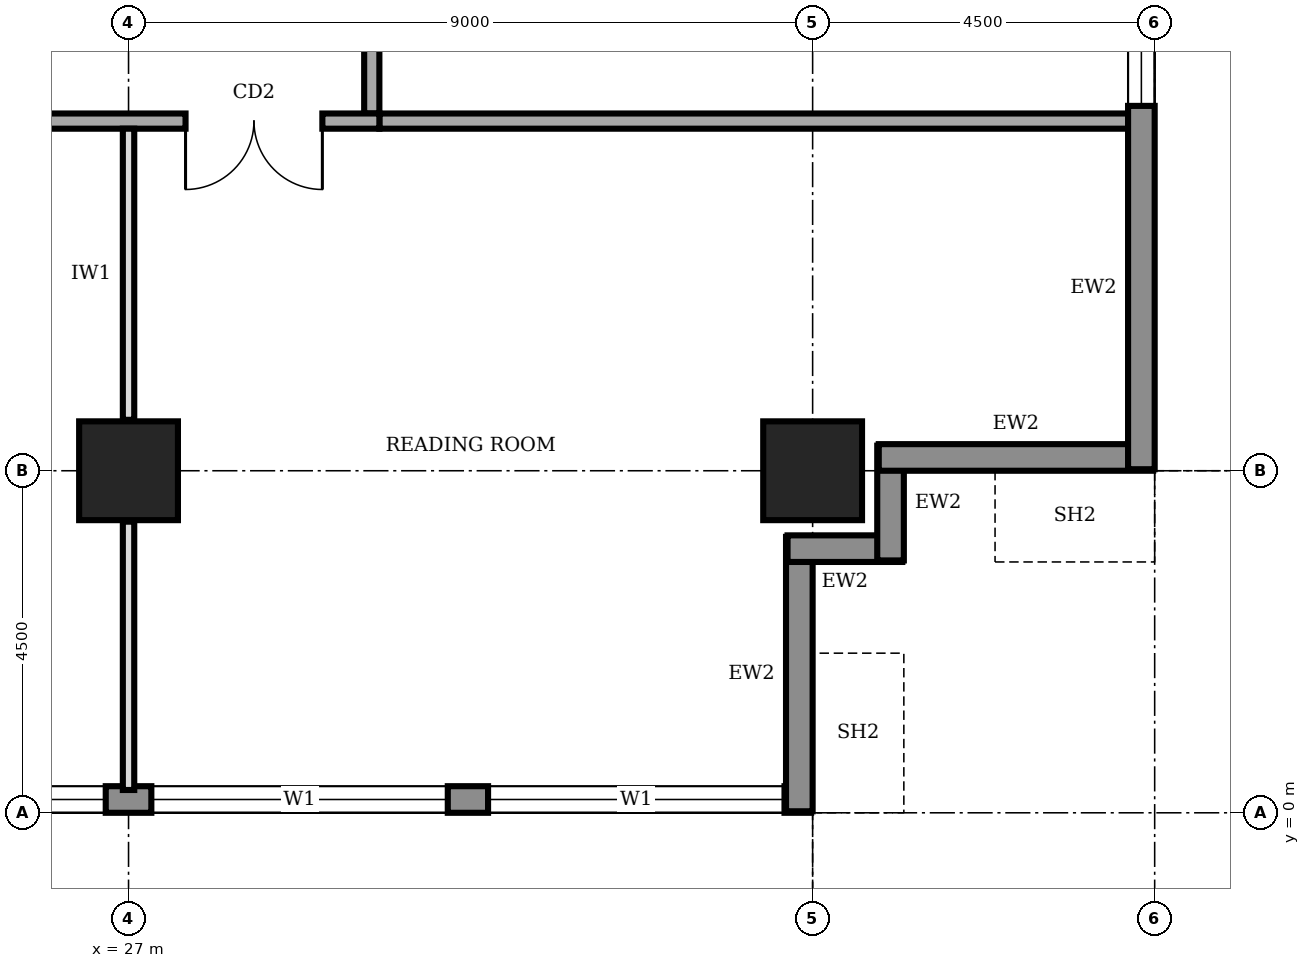
"""IFC4 building model, lengths in metres.
Left out: names, types, materials, properties, quantities, classifications, styles, units other than length and angle.
Written with IfcOpenShell. Run it as: python <this file> out.ifc"""

import sys

from ifc_helpers import new_model, si_unit, direction, frame, frame_2d, origin, origin_2d, place, context, subcontext, project, spatial, rectangle, extrude, element, fill, save


model = new_model("IFC4")
c1 = context("Model", 3, precision=1e-05, world=origin(), true_north=direction((0.0, 1.0)))
c2 = subcontext(c1, "Body", "Model", "MODEL_VIEW")
j1 = project(units=[si_unit("LENGTHUNIT", "METRE"), si_unit("PLANEANGLEUNIT", "RADIAN")], contexts=[c1])
p1 = place(None, origin())
s1 = spatial("IfcSite", under=j1, at=p1, CompositionType="ELEMENT")
p2 = place(p1, origin())
s2 = spatial("IfcBuilding", under=s1, at=p2, CompositionType="ELEMENT")
p3 = place(p2, frame((0.0, 0.0, 285.0)))
s3 = spatial("IfcBuildingStorey", under=s2, at=p3, CompositionType="ELEMENT", Elevation=285.0)
for number, where, z_axis, x_axis in (
    (1, (27.0, 4.5, 0.0), (0.0, 0.0, 1.0), (1.0, 0.0, 0.0)),
    (2, (36.0, 4.5, 0.0), (0.0, 0.0, 1.0), (1.0, 0.0, 0.0)),
):
    element("IfcColumn", number, at=place(p3, frame(where, z_axis=z_axis, x_axis=x_axis)), inside=s3, PredefinedType="COLUMN", context=c2, shape_type="SweptSolid", body=[
        extrude(rectangle(XDim=1.3, YDim=1.3, at=origin_2d()), origin(), (0.0, 0.0, 1.0), 4.0),
    ])
p4 = place(p3, frame((4.52, 0.175, 0.0), z_axis=(0.0, 0.0, 1.0), x_axis=(1.0, 0.0, 0.0)))
e3 = element("IfcWall", 3, at=p4, inside=s3, PredefinedType="STANDARD", context=c2, shape_type="SweptSolid", body=[
    extrude(rectangle(XDim=31.46, YDim=0.35, at=frame_2d((15.73, 0.0))), origin(), (0.0, 0.0, 1.0), 3.75),
])
p5 = place(p4, frame((4.78, 0.0, 0.9)))
e4 = element("IfcOpeningElement", 4, at=p5, cuts=e3, PredefinedType="OPENING", context=c2, shape_type="SweptSolid", body=[
    extrude(rectangle(XDim=3.9, YDim=2.2, at=frame_2d((1.95, 1.1))), frame((0.0, 0.185, 0.0), z_axis=(0.0, -1.0, 0.0), x_axis=(1.0, 0.0, 0.0)), (0.0, 0.0, 1.0), 0.37),
])
p6 = place(p4, frame((9.28, 0.0, 0.9)))
e5 = element("IfcOpeningElement", 5, at=p6, cuts=e3, PredefinedType="OPENING", context=c2, shape_type="SweptSolid", body=[
    extrude(rectangle(XDim=3.9, YDim=2.2, at=frame_2d((1.95, 1.1))), frame((0.0, 0.185, 0.0), z_axis=(0.0, -1.0, 0.0), x_axis=(1.0, 0.0, 0.0)), (0.0, 0.0, 1.0), 0.37),
])
p7 = place(p4, frame((13.78, 0.0, 0.9)))
e6 = element("IfcOpeningElement", 6, at=p7, cuts=e3, PredefinedType="OPENING", context=c2, shape_type="SweptSolid", body=[
    extrude(rectangle(XDim=3.9, YDim=2.2, at=frame_2d((1.95, 1.1))), frame((0.0, 0.185, 0.0), z_axis=(0.0, -1.0, 0.0), x_axis=(1.0, 0.0, 0.0)), (0.0, 0.0, 1.0), 0.37),
])
p8 = place(p4, frame((18.28, 0.0, 0.9)))
e7 = element("IfcOpeningElement", 7, at=p8, cuts=e3, PredefinedType="OPENING", context=c2, shape_type="SweptSolid", body=[
    extrude(rectangle(XDim=3.9, YDim=2.2, at=frame_2d((1.95, 1.1))), frame((0.0, 0.185, 0.0), z_axis=(0.0, -1.0, 0.0), x_axis=(1.0, 0.0, 0.0)), (0.0, 0.0, 1.0), 0.37),
])
p9 = place(p4, frame((22.78, 0.0, 0.9)))
e8 = element("IfcOpeningElement", 8, at=p9, cuts=e3, PredefinedType="OPENING", context=c2, shape_type="SweptSolid", body=[
    extrude(rectangle(XDim=3.9, YDim=2.2, at=frame_2d((1.95, 1.1))), frame((0.0, 0.185, 0.0), z_axis=(0.0, -1.0, 0.0), x_axis=(1.0, 0.0, 0.0)), (0.0, 0.0, 1.0), 0.37),
])
p10 = place(p4, frame((27.21, 0.0, 0.9)))
e9 = element("IfcOpeningElement", 9, at=p10, cuts=e3, PredefinedType="OPENING", context=c2, shape_type="SweptSolid", body=[
    extrude(rectangle(XDim=3.9, YDim=2.2, at=frame_2d((1.95, 1.1))), frame((0.0, 0.185, 0.0), z_axis=(0.0, -1.0, 0.0), x_axis=(1.0, 0.0, 0.0)), (0.0, 0.0, 1.0), 0.37),
])
p11 = place(p3, frame((35.825, 0.02, 0.0), z_axis=(0.0, 0.0, 1.0), x_axis=(0.0, 1.0, 0.0)))
e10 = element("IfcWall", 10, at=p11, inside=s3, PredefinedType="STANDARD", context=c2, shape_type="SweptSolid", body=[
    extrude(rectangle(XDim=3.61, YDim=0.35, at=frame_2d((1.805, 0.0))), origin(), (0.0, 0.0, 1.0), 2.65),
])
for number, where, z_axis, x_axis in (
    (11, (35.67, 3.475, 0.0), (0.0, 0.0, 1.0), (1.0, 0.0, 0.0)),
    (12, (37.025, 3.32, 0.0), (0.0, 0.0, 1.0), (0.0, 1.0, 0.0)),
):
    element("IfcWall", number, at=place(p3, frame(where, z_axis=z_axis, x_axis=x_axis)), inside=s3, PredefinedType="STANDARD", context=c2, shape_type="SweptSolid", body=[
        extrude(rectangle(XDim=1.51, YDim=0.35, at=frame_2d((0.755, 0.0))), origin(), (0.0, 0.0, 1.0), 3.75),
    ])
p12 = place(p3, frame((36.87, 4.675, 0.0), z_axis=(0.0, 0.0, 1.0), x_axis=(1.0, 0.0, 0.0)))
e13 = element("IfcWall", 13, at=p12, inside=s3, PredefinedType="STANDARD", context=c2, shape_type="SweptSolid", body=[
    extrude(rectangle(XDim=3.61, YDim=0.35, at=frame_2d((1.805, 0.0))), origin(), (0.0, 0.0, 1.0), 2.65),
])
p13 = place(p3, frame((40.325, 4.52, 0.0), z_axis=(0.0, 0.0, 1.0), x_axis=(0.0, 1.0, 0.0)))
e14 = element("IfcWall", 14, at=p13, inside=s3, PredefinedType="STANDARD", context=c2, shape_type="SweptSolid", body=[
    extrude(rectangle(XDim=31.46, YDim=0.35, at=frame_2d((15.73, 0.0))), origin(), (0.0, 0.0, 1.0), 3.75),
])
p14 = place(p13, frame((4.78, 0.0, 0.9)))
e15 = element("IfcOpeningElement", 15, at=p14, cuts=e14, PredefinedType="OPENING", context=c2, shape_type="SweptSolid", body=[
    extrude(rectangle(XDim=3.9, YDim=2.2, at=frame_2d((1.95, 1.1))), frame((0.0, 0.185, 0.0), z_axis=(0.0, -1.0, 0.0), x_axis=(1.0, 0.0, 0.0)), (0.0, 0.0, 1.0), 0.37),
])
p15 = place(p13, frame((9.28, 0.0, 0.9)))
e16 = element("IfcOpeningElement", 16, at=p15, cuts=e14, PredefinedType="OPENING", context=c2, shape_type="SweptSolid", body=[
    extrude(rectangle(XDim=3.9, YDim=2.2, at=frame_2d((1.95, 1.1))), frame((0.0, 0.185, 0.0), z_axis=(0.0, -1.0, 0.0), x_axis=(1.0, 0.0, 0.0)), (0.0, 0.0, 1.0), 0.37),
])
p16 = place(p13, frame((13.78, 0.0, 0.9)))
e17 = element("IfcOpeningElement", 17, at=p16, cuts=e14, PredefinedType="OPENING", context=c2, shape_type="SweptSolid", body=[
    extrude(rectangle(XDim=3.9, YDim=2.2, at=frame_2d((1.95, 1.1))), frame((0.0, 0.185, 0.0), z_axis=(0.0, -1.0, 0.0), x_axis=(1.0, 0.0, 0.0)), (0.0, 0.0, 1.0), 0.37),
])
p17 = place(p13, frame((18.28, 0.0, 0.9)))
e18 = element("IfcOpeningElement", 18, at=p17, cuts=e14, PredefinedType="OPENING", context=c2, shape_type="SweptSolid", body=[
    extrude(rectangle(XDim=3.9, YDim=2.2, at=frame_2d((1.95, 1.1))), frame((0.0, 0.185, 0.0), z_axis=(0.0, -1.0, 0.0), x_axis=(1.0, 0.0, 0.0)), (0.0, 0.0, 1.0), 0.37),
])
p18 = place(p13, frame((22.78, 0.0, 0.9)))
e19 = element("IfcOpeningElement", 19, at=p18, cuts=e14, PredefinedType="OPENING", context=c2, shape_type="SweptSolid", body=[
    extrude(rectangle(XDim=3.9, YDim=2.2, at=frame_2d((1.95, 1.1))), frame((0.0, 0.185, 0.0), z_axis=(0.0, -1.0, 0.0), x_axis=(1.0, 0.0, 0.0)), (0.0, 0.0, 1.0), 0.37),
])
p19 = place(p13, frame((27.21, 0.0, 0.9)))
e20 = element("IfcOpeningElement", 20, at=p19, cuts=e14, PredefinedType="OPENING", context=c2, shape_type="SweptSolid", body=[
    extrude(rectangle(XDim=3.9, YDim=2.2, at=frame_2d((1.95, 1.1))), frame((0.0, 0.185, 0.0), z_axis=(0.0, -1.0, 0.0), x_axis=(1.0, 0.0, 0.0)), (0.0, 0.0, 1.0), 0.37),
])
p20 = place(p3, frame((11.9, 9.1, 0.0), z_axis=(0.0, 0.0, 1.0), x_axis=(1.0, 0.0, 0.0)))
e21 = element("IfcWall", 21, at=p20, inside=s3, PredefinedType="SOLIDWALL", context=c2, shape_type="SweptSolid", body=[
    extrude(rectangle(XDim=18.4, YDim=0.2, at=frame_2d((9.2, 0.0))), origin(), (0.0, 0.0, 1.0), 3.75),
])
p21 = place(p20, frame((6.55, 0.0, 0.0)))
e22 = element("IfcOpeningElement", 22, at=p21, cuts=e21, PredefinedType="OPENING", context=c2, shape_type="SweptSolid", body=[
    extrude(rectangle(XDim=1.8, YDim=2.1, at=frame_2d((0.9, 1.05))), frame((0.0, 0.11, 0.0), z_axis=(0.0, -1.0, 0.0), x_axis=(1.0, 0.0, 0.0)), (0.0, 0.0, 1.0), 0.22),
])
p22 = place(p20, frame((15.85, 0.0, 0.0)))
e23 = element("IfcOpeningElement", 23, at=p22, cuts=e21, PredefinedType="OPENING", context=c2, shape_type="SweptSolid", body=[
    extrude(rectangle(XDim=1.8, YDim=2.1, at=frame_2d((0.9, 1.05))), frame((0.0, 0.11, 0.0), z_axis=(0.0, -1.0, 0.0), x_axis=(1.0, 0.0, 0.0)), (0.0, 0.0, 1.0), 0.22),
])
p23 = place(p3, frame((30.2, 9.2, 0.0), z_axis=(0.0, 0.0, 1.0), x_axis=(0.0, 1.0, 0.0)))
e24 = element("IfcWall", 24, at=p23, inside=s3, PredefinedType="SOLIDWALL", context=c2, shape_type="SweptSolid", body=[
    extrude(rectangle(XDim=22.3, YDim=0.2, at=frame_2d((11.15, 0.0))), origin(), (0.0, 0.0, 1.0), 3.75),
])
p24 = place(p23, frame((5.65, 0.0, 0.0)))
e25 = element("IfcOpeningElement", 25, at=p24, cuts=e24, PredefinedType="OPENING", context=c2, shape_type="SweptSolid", body=[
    extrude(rectangle(XDim=1.8, YDim=2.1, at=frame_2d((0.9, 1.05))), frame((0.0, 0.11, 0.0), z_axis=(0.0, -1.0, 0.0), x_axis=(1.0, 0.0, 0.0)), (0.0, 0.0, 1.0), 0.22),
])
p25 = place(p23, frame((17.3, 0.0, 0.0)))
e26 = element("IfcOpeningElement", 26, at=p25, cuts=e24, PredefinedType="OPENING", context=c2, shape_type="SweptSolid", body=[
    extrude(rectangle(XDim=1.0, YDim=2.1, at=frame_2d((0.5, 1.05))), frame((0.0, 0.11, 0.0), z_axis=(0.0, -1.0, 0.0), x_axis=(1.0, 0.0, 0.0)), (0.0, 0.0, 1.0), 0.22),
])
p26 = place(p3, frame((30.3, 9.1, 0.0), z_axis=(0.0, 0.0, 1.0), x_axis=(1.0, 0.0, 0.0)))
e27 = element("IfcWall", 27, at=p26, inside=s3, PredefinedType="SOLIDWALL", context=c2, shape_type="SweptSolid", body=[
    extrude(rectangle(XDim=9.9, YDim=0.2, at=frame_2d((4.95, 0.0))), origin(), (0.0, 0.0, 1.0), 3.75),
])
p27 = place(p3, frame((27.0, 0.3, 0.0), z_axis=(0.0, 0.0, 1.0), x_axis=(0.0, 1.0, 0.0)))
e28 = element("IfcWall", 28, at=p27, inside=s3, PredefinedType="PARTITIONING", context=c2, shape_type="SweptSolid", body=[
    extrude(rectangle(XDim=3.53, YDim=0.15, at=frame_2d((1.765, 0.0))), origin(), (0.0, 0.0, 1.0), 2.65),
])
p28 = place(p3, frame((27.0, 5.17, 0.0), z_axis=(0.0, 0.0, 1.0), x_axis=(0.0, 1.0, 0.0)))
e29 = element("IfcWall", 29, at=p28, inside=s3, PredefinedType="PARTITIONING", context=c2, shape_type="SweptSolid", body=[
    extrude(rectangle(XDim=3.83, YDim=0.15, at=frame_2d((1.915, 0.0))), origin(), (0.0, 0.0, 1.0), 2.85),
])
p29 = place(p8, origin())
e30 = element("IfcWindow", 30, at=p29, inside=s3, PartitioningType="SINGLE_PANEL", PredefinedType="WINDOW", context=c2, shape_type="SweptSolid", body=[
    extrude(rectangle(XDim=3.9, YDim=2.2, at=frame_2d((1.95, 1.1))), frame((0.0, 0.03, 0.0), z_axis=(0.0, -1.0, 0.0), x_axis=(1.0, 0.0, 0.0)), (0.0, 0.0, 1.0), 0.06),
])
fill(e7, e30)
p30 = place(p9, origin())
e31 = element("IfcWindow", 31, at=p30, inside=s3, PartitioningType="SINGLE_PANEL", PredefinedType="WINDOW", context=c2, shape_type="SweptSolid", body=[
    extrude(rectangle(XDim=3.9, YDim=2.2, at=frame_2d((1.95, 1.1))), frame((0.0, 0.03, 0.0), z_axis=(0.0, -1.0, 0.0), x_axis=(1.0, 0.0, 0.0)), (0.0, 0.0, 1.0), 0.06),
])
fill(e8, e31)
p31 = place(p10, origin())
e32 = element("IfcWindow", 32, at=p31, inside=s3, PartitioningType="SINGLE_PANEL", PredefinedType="WINDOW", context=c2, shape_type="SweptSolid", body=[
    extrude(rectangle(XDim=3.9, YDim=2.2, at=frame_2d((1.95, 1.1))), frame((0.0, 0.03, 0.0), z_axis=(0.0, -1.0, 0.0), x_axis=(1.0, 0.0, 0.0)), (0.0, 0.0, 1.0), 0.06),
])
fill(e9, e32)
p32 = place(p14, origin())
e33 = element("IfcWindow", 33, at=p32, inside=s3, PartitioningType="SINGLE_PANEL", PredefinedType="WINDOW", context=c2, shape_type="SweptSolid", body=[
    extrude(rectangle(XDim=3.9, YDim=2.2, at=frame_2d((1.95, 1.1))), frame((0.0, 0.03, 0.0), z_axis=(0.0, -1.0, 0.0), x_axis=(1.0, 0.0, 0.0)), (0.0, 0.0, 1.0), 0.06),
])
fill(e15, e33)
p33 = place(p22, frame((1.8, 0.0, 0.0), z_axis=(0.0, 0.0, 1.0), x_axis=(-1.0, 0.0, 0.0)))
e34 = element("IfcDoor", 34, at=p33, inside=s3, OperationType="DOUBLE_DOOR_SINGLE_SWING", PredefinedType="DOOR", context=c2, shape_type="SweptSolid", body=[
    extrude(rectangle(XDim=1.8, YDim=2.1, at=frame_2d((0.9, 1.05))), frame((0.0, 0.025, 0.0), z_axis=(0.0, -1.0, 0.0), x_axis=(1.0, 0.0, 0.0)), (0.0, 0.0, 1.0), 0.05),
])
fill(e23, e34)
save(model, sys.argv[1])
